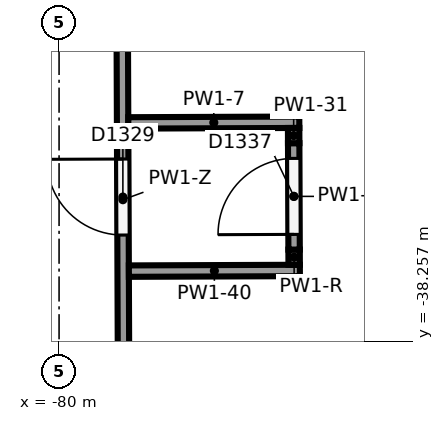
"""IFC4 building model, lengths in metres.
Left out: names, types, materials, properties, quantities, classifications, styles, units other than length and angle.
Written with IfcOpenShell. Run it as: python <this file> out.ifc"""

import sys

from ifc_helpers import new_model, si_unit, direction, frame, frame_2d, origin, place, context, subcontext, project, spatial, rectangle, extrude, element, fill, save


model = new_model("IFC4")
c1 = context("Model", 3, precision=1e-05, world=origin(), true_north=direction((0.0, 1.0)))
c2 = subcontext(c1, "Body", "Model", "MODEL_VIEW")
j1 = project(units=[si_unit("LENGTHUNIT", "METRE"), si_unit("PLANEANGLEUNIT", "RADIAN")], contexts=[c1])
p1 = place(None, origin())
s1 = spatial("IfcSite", under=j1, at=p1, CompositionType="ELEMENT")
p2 = place(p1, origin())
s2 = spatial("IfcBuilding", under=s1, at=p2, CompositionType="ELEMENT")
p3 = place(p2, frame((0.0, 0.0, 18.0)))
s3 = spatial("IfcBuildingStorey", under=s2, at=p3, CompositionType="ELEMENT", Elevation=18.0)
p4 = place(p3, frame((-79.14, -41.81, 0.0), z_axis=(0.0, 0.0, 1.0), x_axis=(-0.003787424647, 0.999992827682, 0.0)))
e1 = element("IfcWall", 1, at=p4, inside=s3, PredefinedType="PARTITIONING", context=c2, shape_type="SweptSolid", body=[
    extrude(rectangle(XDim=10.829, YDim=0.15, at=frame_2d((5.415, 0.0))), origin(), (0.0, 0.0, 1.0), 3.423),
])
p5 = place(p4, frame((4.95, 0.0, 0.0)))
e2 = element("IfcOpeningElement", 2, at=p5, cuts=e1, PredefinedType="OPENING", context=c2, shape_type="SweptSolid", body=[
    extrude(rectangle(XDim=1.0, YDim=2.1, at=frame_2d((0.5, 1.05))), frame((0.0, 0.085, 0.0), z_axis=(0.0, -1.0, 0.0), x_axis=(1.0, 0.0, 0.0)), (0.0, 0.0, 1.0), 0.17),
])
p6 = place(p3, frame((-79.082, -37.335, 0.0), z_axis=(0.0, 0.0, 1.0), x_axis=(0.999992788652, 0.003797715669, 0.0)))
e3 = element("IfcWall", 3, at=p6, inside=s3, PredefinedType="PARTITIONING", context=c2, shape_type="SweptSolid", body=[
    extrude(rectangle(XDim=2.25, YDim=0.15, at=frame_2d((1.125, 0.0))), origin(), (0.0, 0.0, 1.0), 5.694),
])
p7 = place(p3, frame((-79.089, -35.385, 0.0), z_axis=(0.0, 0.0, 1.0), x_axis=(0.999992788652, 0.003797715669, 0.0)))
e4 = element("IfcWall", 4, at=p7, inside=s3, PredefinedType="PARTITIONING", context=c2, shape_type="SweptSolid", body=[
    extrude(rectangle(XDim=2.25, YDim=0.15, at=frame_2d((1.125, 0.0))), origin(), (0.0, 0.0, 1.0), 5.618),
])
p8 = place(p3, frame((-76.907, -37.251, 0.0), z_axis=(0.0, 0.0, 1.0), x_axis=(-0.003662979089, 0.99999329127, 0.0)))
e5 = element("IfcWall", 5, at=p8, inside=s3, PredefinedType="PARTITIONING", context=c2, shape_type="SweptSolid", body=[
    extrude(rectangle(XDim=0.2, YDim=0.15, at=frame_2d((0.1, 0.0))), origin(), (0.0, 0.0, 1.0), 5.715),
])
p9 = place(p3, frame((-76.908, -37.052, 0.0), z_axis=(0.0, 0.0, 1.0), x_axis=(-0.003836734927, 0.999992639705, 0.0)))
e6 = element("IfcWall", 6, at=p9, inside=s3, PredefinedType="PARTITIONING", context=c2, shape_type="SweptSolid", body=[
    extrude(rectangle(XDim=1.4, YDim=0.15, at=frame_2d((0.7, 0.0))), origin(), (0.0, 0.0, 1.0), 5.676),
])
p10 = place(p9, frame((0.2, 0.0, 0.0)))
e7 = element("IfcOpeningElement", 7, at=p10, cuts=e6, PredefinedType="OPENING", context=c2, shape_type="SweptSolid", body=[
    extrude(rectangle(XDim=1.0, YDim=2.1, at=frame_2d((0.5, 1.05))), frame((0.0, 0.085, 0.0), z_axis=(0.0, -1.0, 0.0), x_axis=(1.0, 0.0, 0.0)), (0.0, 0.0, 1.0), 0.17),
])
p11 = place(p3, frame((-76.913, -35.652, 0.0), z_axis=(0.0, 0.0, 1.0), x_axis=(-0.003658512101, 0.999993307622, 0.0)))
e8 = element("IfcWall", 8, at=p11, inside=s3, PredefinedType="PARTITIONING", context=c2, shape_type="SweptSolid", body=[
    extrude(rectangle(XDim=0.2, YDim=0.15, at=frame_2d((0.1, 0.0))), origin(), (0.0, 0.0, 1.0), 5.668),
])
p12 = place(p5, origin())
e9 = element("IfcDoor", 9, at=p12, inside=s3, OperationType="SINGLE_SWING_RIGHT", PredefinedType="DOOR", context=c2, shape_type="SweptSolid", body=[
    extrude(rectangle(XDim=1.0, YDim=2.1, at=frame_2d((0.5, 1.05))), frame((0.0, 0.025, 0.0), z_axis=(0.0, -1.0, 0.0), x_axis=(1.0, 0.0, 0.0)), (0.0, 0.0, 1.0), 0.05),
])
fill(e2, e9)
p13 = place(p10, origin())
e10 = element("IfcDoor", 10, at=p13, inside=s3, OperationType="SINGLE_SWING_LEFT", PredefinedType="DOOR", context=c2, shape_type="SweptSolid", body=[
    extrude(rectangle(XDim=1.0, YDim=2.1, at=frame_2d((0.5, 1.05))), frame((0.0, 0.025, 0.0), z_axis=(0.0, -1.0, 0.0), x_axis=(1.0, 0.0, 0.0)), (0.0, 0.0, 1.0), 0.05),
])
fill(e7, e10)
save(model, sys.argv[1])
